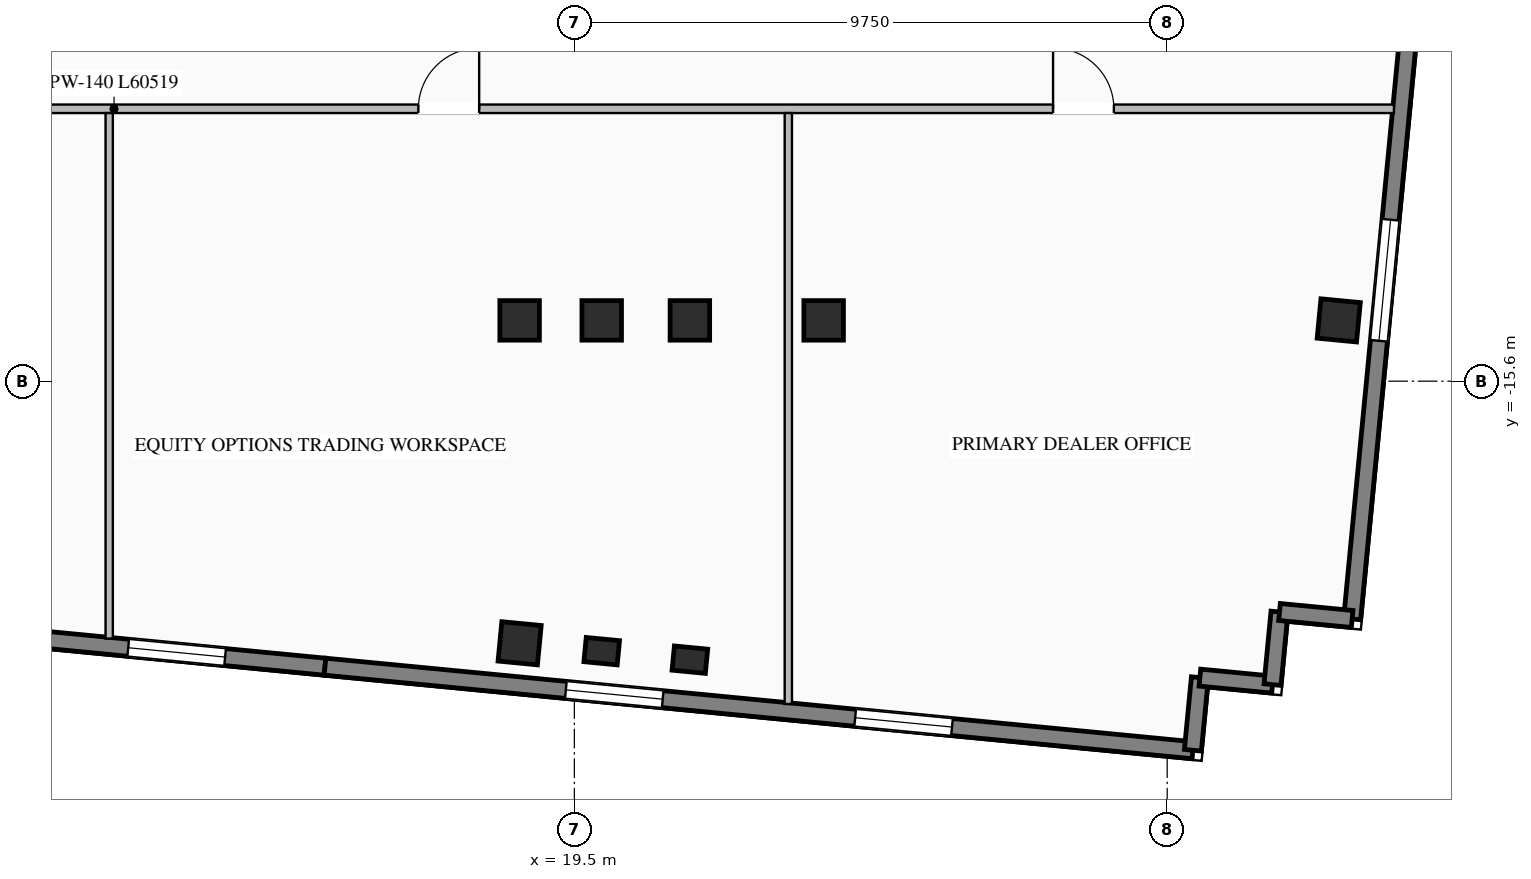
"""IFC4 building model, lengths in metres.
Left out: names, types, materials, properties, quantities, classifications, styles, units other than length and angle.
Written with IfcOpenShell. Run it as: python <this file> out.ifc"""

import sys

from ifc_helpers import new_model, si_unit, direction, frame, frame_2d, origin, origin_2d, place, context, subcontext, project, spatial, rectangle, i_section, extrude, element, fill, save


model = new_model("IFC4")
c1 = context("Model", 3, precision=1e-05, world=origin(), true_north=direction((0.0, 1.0)))
c2 = subcontext(c1, "Body", "Model", "MODEL_VIEW")
j1 = project(units=[si_unit("LENGTHUNIT", "METRE"), si_unit("PLANEANGLEUNIT", "RADIAN")], contexts=[c1])
p1 = place(None, origin())
s1 = spatial("IfcSite", under=j1, at=p1, CompositionType="ELEMENT")
p2 = place(p1, origin())
s2 = spatial("IfcBuilding", under=s1, at=p2, CompositionType="ELEMENT")
p3 = place(p2, frame((0.0, 0.0, 181.1)))
s3 = spatial("IfcBuildingStorey", under=s2, at=p3, CompositionType="ELEMENT", Elevation=181.1)
for number, where, z_axis, x_axis in (
    (1, (18.6, -14.6, 0.0), (0.0, 0.0, 1.0), (1.0, 0.0, 0.0)),
    (2, (19.95, -14.6, 0.0), (0.0, 0.0, 1.0), (1.0, 0.0, 0.0)),
    (3, (21.4, -14.6, 0.0), (0.0, 0.0, 1.0), (1.0, 0.0, 0.0)),
    (4, (23.6, -14.6, 0.0), (0.0, 0.0, 1.0), (1.0, 0.0, 0.0)),
    (5, (18.6, -19.911, 0.0), (0.0, 0.0, 1.0), (0.995, -0.096, 0.0)),
    (6, (32.071, -14.6, 0.0), (0.0, 0.0, 1.0), (0.995, -0.096, 0.0)),
):
    element("IfcColumn", number, at=place(p3, frame(where, z_axis=z_axis, x_axis=x_axis)), inside=s3, PredefinedType="COLUMN", context=c2, shape_type="SweptSolid", body=[
        extrude(i_section(OverallWidth=0.65, OverallDepth=0.65, WebThickness=0.028, FlangeThickness=0.04, at=origin_2d()), origin(), (0.0, 0.0, 1.0), 3.45),
    ])
for number, where, z_axis, x_axis in (
    (7, (19.95, -20.041, 0.0), (0.0, 0.0, 1.0), (0.995, -0.096, 0.0)),
    (8, (21.4, -20.18, 0.0), (0.0, 0.0, 1.0), (0.995, -0.096, 0.0)),
):
    element("IfcColumn", number, at=place(p3, frame(where, z_axis=z_axis, x_axis=x_axis)), inside=s3, PredefinedType="PILASTER", context=c2, shape_type="SweptSolid", body=[
        extrude(rectangle(XDim=0.55, YDim=0.4, at=origin_2d()), origin(), (0.0, 0.0, 1.0), 3.45),
    ])
p4 = place(p3, frame((15.399, -20.296, 0.0), z_axis=(0.0, 0.0, 1.0), x_axis=(-0.995394455533, 0.09586385082, 0.0)))
e9 = element("IfcWall", 9, at=p4, inside=s3, PredefinedType="STANDARD", context=c2, shape_type="SweptSolid", body=[
    extrude(rectangle(XDim=9.0, YDim=0.28, at=frame_2d((4.5, 0.0))), origin(), (0.0, 0.0, 1.0), 3.25),
])
p5 = place(p4, frame((1.65, 0.0, 0.76)))
e10 = element("IfcOpeningElement", 10, at=p5, cuts=e9, PredefinedType="OPENING", context=c2, shape_type="SweptSolid", body=[
    extrude(rectangle(XDim=1.6, YDim=1.95, at=frame_2d((0.8, 0.975))), frame((0.0, 0.15, 0.0), z_axis=(0.0, -1.0, 0.0), x_axis=(1.0, 0.0, 0.0)), (0.0, 0.0, 1.0), 0.3),
])
p6 = place(p4, frame((5.2, 0.0, 0.76)))
e11 = element("IfcOpeningElement", 11, at=p6, cuts=e9, PredefinedType="OPENING", context=c2, shape_type="SweptSolid", body=[
    extrude(rectangle(XDim=1.6, YDim=1.95, at=frame_2d((0.8, 0.975))), frame((0.0, 0.15, 0.0), z_axis=(0.0, -1.0, 0.0), x_axis=(1.0, 0.0, 0.0)), (0.0, 0.0, 1.0), 0.3),
])
p7 = place(p3, frame((29.673, -21.67, 0.0), z_axis=(0.0, 0.0, 1.0), x_axis=(-0.995397230529, 0.095835032509, 0.0)))
e12 = element("IfcWall", 12, at=p7, inside=s3, PredefinedType="STANDARD", context=c2, shape_type="SweptSolid", body=[
    extrude(rectangle(XDim=14.34, YDim=0.28, at=frame_2d((7.17, 0.0))), origin(), (0.0, 0.0, 1.0), 3.25),
])
p8 = place(p7, frame((3.98, 0.0, 0.76)))
e13 = element("IfcOpeningElement", 13, at=p8, cuts=e12, PredefinedType="OPENING", context=c2, shape_type="SweptSolid", body=[
    extrude(rectangle(XDim=1.6, YDim=1.95, at=frame_2d((0.8, 0.975))), frame((0.0, 0.15, 0.0), z_axis=(0.0, -1.0, 0.0), x_axis=(1.0, 0.0, 0.0)), (0.0, 0.0, 1.0), 0.3),
])
p9 = place(p7, frame((8.76, 0.0, 0.76)))
e14 = element("IfcOpeningElement", 14, at=p9, cuts=e12, PredefinedType="OPENING", context=c2, shape_type="SweptSolid", body=[
    extrude(rectangle(XDim=1.6, YDim=1.95, at=frame_2d((0.8, 0.975))), frame((0.0, 0.15, 0.0), z_axis=(0.0, -1.0, 0.0), x_axis=(1.0, 0.0, 0.0)), (0.0, 0.0, 1.0), 0.3),
])
p10 = place(p3, frame((33.901, -2.798, 0.0), z_axis=(0.0, 0.0, 1.0), x_axis=(-0.095853434568, -0.99539545864, 0.0)))
e15 = element("IfcWall", 15, at=p10, inside=s3, PredefinedType="STANDARD", context=c2, shape_type="SweptSolid", body=[
    extrude(rectangle(XDim=16.79, YDim=0.28, at=frame_2d((8.395, 0.0))), origin(), (0.0, 0.0, 1.0), 3.25),
])
p11 = place(p10, frame((3.547, 0.0, 0.76)))
e16 = element("IfcOpeningElement", 16, at=p11, cuts=e15, PredefinedType="OPENING", context=c2, shape_type="SweptSolid", body=[
    extrude(rectangle(XDim=2.0, YDim=2.05, at=frame_2d((1.0, 1.025))), frame((0.0, 0.15, 0.0), z_axis=(0.0, -1.0, 0.0), x_axis=(1.0, 0.0, 0.0)), (0.0, 0.0, 1.0), 0.3),
])
p12 = place(p10, frame((10.193, 0.0, 0.76)))
e17 = element("IfcOpeningElement", 17, at=p12, cuts=e15, PredefinedType="OPENING", context=c2, shape_type="SweptSolid", body=[
    extrude(rectangle(XDim=2.0, YDim=2.05, at=frame_2d((1.0, 1.025))), frame((0.0, 0.15, 0.0), z_axis=(0.0, -1.0, 0.0), x_axis=(1.0, 0.0, 0.0)), (0.0, 0.0, 1.0), 0.3),
])
for number, where, z_axis, x_axis in (
    (18, (29.673, -21.67, 0.0), (0.0, 0.0, 1.0), (0.096, 0.995, 0.0)),
    (19, (29.788, -20.476, 0.0), (0.0, 0.0, 1.0), (0.995, -0.096, 0.0)),
):
    element("IfcWall", number, at=place(p3, frame(where, z_axis=z_axis, x_axis=x_axis)), inside=s3, PredefinedType="STANDARD", context=c2, shape_type="SweptSolid", body=[
        extrude(rectangle(XDim=1.2, YDim=0.28, at=frame_2d((0.6, 0.0))), origin(), (0.0, 0.0, 1.0), 3.25),
    ])
p13 = place(p3, frame((30.982, -20.591, 0.0), z_axis=(0.0, 0.0, 1.0), x_axis=(0.096018626938, 0.995379537303, 0.0)))
e20 = element("IfcWall", 20, at=p13, inside=s3, PredefinedType="STANDARD", context=c2, shape_type="SweptSolid", body=[
    extrude(rectangle(XDim=1.2, YDim=0.28, at=frame_2d((0.6, 0.0))), origin(), (0.0, 0.0, 1.0), 3.25),
])
p14 = place(p3, frame((31.097, -19.396, 0.0), z_axis=(0.0, 0.0, 1.0), x_axis=(0.995397091755, -0.095836473879, 0.0)))
e21 = element("IfcWall", 21, at=p14, inside=s3, PredefinedType="STANDARD", context=c2, shape_type="SweptSolid", body=[
    extrude(rectangle(XDim=1.2, YDim=0.28, at=frame_2d((0.6, 0.0))), origin(), (0.0, 0.0, 1.0), 3.25),
])
p15 = place(p3, frame((-27.54, -11.12, 0.0), z_axis=(0.0, 0.0, 1.0), x_axis=(1.0, 0.0, 0.0)))
e22 = element("IfcWall", 22, at=p15, inside=s3, PredefinedType="STANDARD", context=c2, shape_type="SweptSolid", body=[
    extrude(rectangle(XDim=60.519, YDim=0.14, at=frame_2d((30.259, 0.0))), origin(), (0.0, 0.0, 1.0), 3.25),
])
p16 = place(p15, frame((20.63, 0.0, 0.0)))
e23 = element("IfcOpeningElement", 23, at=p16, cuts=e22, PredefinedType="OPENING", context=c2, shape_type="SweptSolid", body=[
    extrude(rectangle(XDim=0.92, YDim=2.08, at=frame_2d((0.46, 1.04))), frame((0.0, 0.08, 0.0), z_axis=(0.0, -1.0, 0.0), x_axis=(1.0, 0.0, 0.0)), (0.0, 0.0, 1.0), 0.16),
])
p17 = place(p15, frame((24.13, 0.0, 0.0)))
e24 = element("IfcOpeningElement", 24, at=p17, cuts=e22, PredefinedType="OPENING", context=c2, shape_type="SweptSolid", body=[
    extrude(rectangle(XDim=0.92, YDim=2.08, at=frame_2d((0.46, 1.04))), frame((0.0, 0.08, 0.0), z_axis=(0.0, -1.0, 0.0), x_axis=(1.0, 0.0, 0.0)), (0.0, 0.0, 1.0), 0.16),
])
p18 = place(p15, frame((26.98, 0.0, 0.0)))
e25 = element("IfcOpeningElement", 25, at=p18, cuts=e22, PredefinedType="OPENING", context=c2, shape_type="SweptSolid", body=[
    extrude(rectangle(XDim=0.92, YDim=2.08, at=frame_2d((0.46, 1.04))), frame((0.0, 0.08, 0.0), z_axis=(0.0, -1.0, 0.0), x_axis=(1.0, 0.0, 0.0)), (0.0, 0.0, 1.0), 0.16),
])
p19 = place(p15, frame((2.856, 0.0, 0.0)))
e26 = element("IfcOpeningElement", 26, at=p19, cuts=e22, PredefinedType="OPENING", context=c2, shape_type="SweptSolid", body=[
    extrude(rectangle(XDim=1.0, YDim=2.08, at=frame_2d((0.5, 1.04))), frame((0.0, 0.08, 0.0), z_axis=(0.0, -1.0, 0.0), x_axis=(1.0, 0.0, 0.0)), (0.0, 0.0, 1.0), 0.16),
])
p20 = place(p15, frame((9.376, 0.0, 0.0)))
e27 = element("IfcOpeningElement", 27, at=p20, cuts=e22, PredefinedType="OPENING", context=c2, shape_type="SweptSolid", body=[
    extrude(rectangle(XDim=1.0, YDim=2.08, at=frame_2d((0.5, 1.04))), frame((0.0, 0.08, 0.0), z_axis=(0.0, -1.0, 0.0), x_axis=(1.0, 0.0, 0.0)), (0.0, 0.0, 1.0), 0.16),
])
p21 = place(p15, frame((15.815, 0.0, 0.0)))
e28 = element("IfcOpeningElement", 28, at=p21, cuts=e22, PredefinedType="OPENING", context=c2, shape_type="SweptSolid", body=[
    extrude(rectangle(XDim=1.0, YDim=2.08, at=frame_2d((0.5, 1.04))), frame((0.0, 0.08, 0.0), z_axis=(0.0, -1.0, 0.0), x_axis=(1.0, 0.0, 0.0)), (0.0, 0.0, 1.0), 0.16),
])
p22 = place(p15, frame((33.465, 0.0, 0.0)))
e29 = element("IfcOpeningElement", 29, at=p22, cuts=e22, PredefinedType="OPENING", context=c2, shape_type="SweptSolid", body=[
    extrude(rectangle(XDim=1.0, YDim=2.08, at=frame_2d((0.5, 1.04))), frame((0.0, 0.08, 0.0), z_axis=(0.0, -1.0, 0.0), x_axis=(1.0, 0.0, 0.0)), (0.0, 0.0, 1.0), 0.16),
])
p23 = place(p15, frame((44.474, 0.0, 0.0)))
e30 = element("IfcOpeningElement", 30, at=p23, cuts=e22, PredefinedType="OPENING", context=c2, shape_type="SweptSolid", body=[
    extrude(rectangle(XDim=1.0, YDim=2.08, at=frame_2d((0.5, 1.04))), frame((0.0, 0.08, 0.0), z_axis=(0.0, -1.0, 0.0), x_axis=(1.0, 0.0, 0.0)), (0.0, 0.0, 1.0), 0.16),
])
p24 = place(p15, frame((54.913, 0.0, 0.0)))
e31 = element("IfcOpeningElement", 31, at=p24, cuts=e22, PredefinedType="OPENING", context=c2, shape_type="SweptSolid", body=[
    extrude(rectangle(XDim=1.0, YDim=2.08, at=frame_2d((0.5, 1.04))), frame((0.0, 0.08, 0.0), z_axis=(0.0, -1.0, 0.0), x_axis=(1.0, 0.0, 0.0)), (0.0, 0.0, 1.0), 0.16),
])
p25 = place(p3, frame((11.85, -19.833, 0.0), z_axis=(0.0, 0.0, 1.0), x_axis=(0.0, 1.0, 0.0)))
e32 = element("IfcWall", 32, at=p25, inside=s3, PredefinedType="STANDARD", context=c2, shape_type="SweptSolid", body=[
    extrude(rectangle(XDim=8.643, YDim=0.12, at=frame_2d((4.322, 0.0))), origin(), (0.0, 0.0, 1.0), 3.25),
])
p26 = place(p3, frame((23.019, -20.909, 0.0), z_axis=(0.0, 0.0, 1.0), x_axis=(0.0, 1.0, 0.0)))
e33 = element("IfcWall", 33, at=p26, inside=s3, PredefinedType="STANDARD", context=c2, shape_type="SweptSolid", body=[
    extrude(rectangle(XDim=9.719, YDim=0.12, at=frame_2d((4.859, 0.0))), origin(), (0.0, 0.0, 1.0), 3.25),
])
p27 = place(p5, origin())
e34 = element("IfcWindow", 34, at=p27, inside=s3, PartitioningType="SINGLE_PANEL", PredefinedType="WINDOW", context=c2, shape_type="SweptSolid", body=[
    extrude(rectangle(XDim=1.6, YDim=1.95, at=frame_2d((0.8, 0.975))), frame((0.0, 0.03, 0.0), z_axis=(0.0, -1.0, 0.0), x_axis=(1.0, 0.0, 0.0)), (0.0, 0.0, 1.0), 0.06),
])
fill(e10, e34)
p28 = place(p8, origin())
e35 = element("IfcWindow", 35, at=p28, inside=s3, PartitioningType="SINGLE_PANEL", PredefinedType="WINDOW", context=c2, shape_type="SweptSolid", body=[
    extrude(rectangle(XDim=1.6, YDim=1.95, at=frame_2d((0.8, 0.975))), frame((0.0, 0.03, 0.0), z_axis=(0.0, -1.0, 0.0), x_axis=(1.0, 0.0, 0.0)), (0.0, 0.0, 1.0), 0.06),
])
fill(e13, e35)
p29 = place(p9, origin())
e36 = element("IfcWindow", 36, at=p29, inside=s3, PartitioningType="SINGLE_PANEL", PredefinedType="WINDOW", context=c2, shape_type="SweptSolid", body=[
    extrude(rectangle(XDim=1.6, YDim=1.95, at=frame_2d((0.8, 0.975))), frame((0.0, 0.03, 0.0), z_axis=(0.0, -1.0, 0.0), x_axis=(1.0, 0.0, 0.0)), (0.0, 0.0, 1.0), 0.06),
])
fill(e14, e36)
p30 = place(p12, origin())
e37 = element("IfcWindow", 37, at=p30, inside=s3, PartitioningType="DOUBLE_PANEL_VERTICAL", PredefinedType="WINDOW", context=c2, shape_type="SweptSolid", body=[
    extrude(rectangle(XDim=2.0, YDim=2.05, at=frame_2d((1.0, 1.025))), frame((0.0, 0.03, 0.0), z_axis=(0.0, -1.0, 0.0), x_axis=(1.0, 0.0, 0.0)), (0.0, 0.0, 1.0), 0.06),
])
fill(e17, e37)
p31 = place(p23, origin())
e38 = element("IfcDoor", 38, at=p31, inside=s3, OperationType="SINGLE_SWING_RIGHT", PredefinedType="DOOR", context=c2, shape_type="SweptSolid", body=[
    extrude(rectangle(XDim=1.0, YDim=2.08, at=frame_2d((0.5, 1.04))), frame((0.0, 0.025, 0.0), z_axis=(0.0, -1.0, 0.0), x_axis=(1.0, 0.0, 0.0)), (0.0, 0.0, 1.0), 0.05),
])
fill(e30, e38)
p32 = place(p24, origin())
e39 = element("IfcDoor", 39, at=p32, inside=s3, OperationType="SINGLE_SWING_LEFT", PredefinedType="DOOR", context=c2, shape_type="SweptSolid", body=[
    extrude(rectangle(XDim=1.0, YDim=2.08, at=frame_2d((0.5, 1.04))), frame((0.0, 0.025, 0.0), z_axis=(0.0, -1.0, 0.0), x_axis=(1.0, 0.0, 0.0)), (0.0, 0.0, 1.0), 0.05),
])
fill(e31, e39)
save(model, sys.argv[1])
